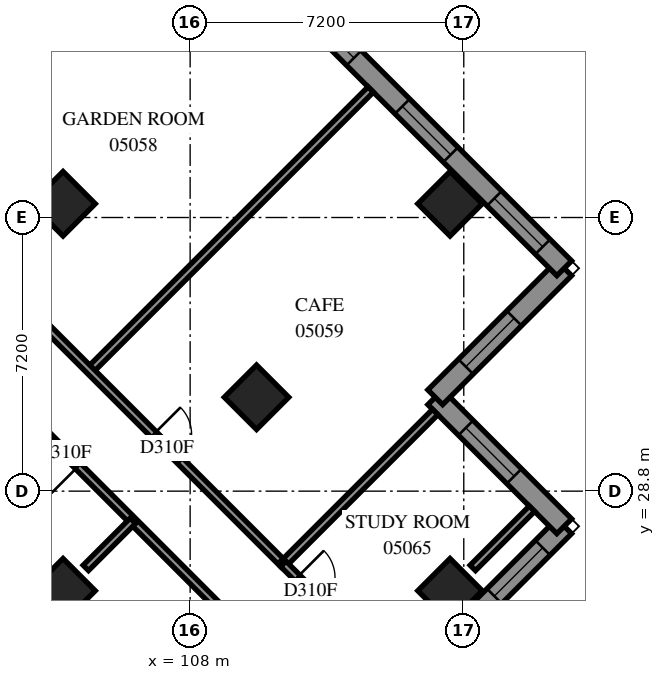
"""IFC4 building model, lengths in metres.
Left out: names, types, materials, properties, quantities, classifications, styles, units other than length and angle.
Written with IfcOpenShell. Run it as: python <this file> out.ifc"""

import sys

from ifc_helpers import new_model, si_unit, direction, frame, frame_2d, origin, origin_2d, place, context, subcontext, project, spatial, polyline, rectangle, outline, extrude, element, fill, save


model = new_model("IFC4")
c1 = context("Model", 3, precision=1e-05, world=origin(), true_north=direction((0.0, 1.0)))
c2 = subcontext(c1, "Body", "Model", "MODEL_VIEW")
j1 = project(units=[si_unit("LENGTHUNIT", "METRE"), si_unit("PLANEANGLEUNIT", "RADIAN")], contexts=[c1])
p1 = place(None, origin())
s1 = spatial("IfcSite", under=j1, at=p1, CompositionType="ELEMENT")
p2 = place(p1, origin())
s2 = spatial("IfcBuilding", under=s1, at=p2, CompositionType="ELEMENT")
p3 = place(p2, frame((0.0, 0.0, 22.8)))
s3 = spatial("IfcBuildingStorey", under=s2, at=p3, CompositionType="ELEMENT", Elevation=22.8)
for number, where, z_axis, x_axis in (
    (1, (104.656, 36.362, 0.0), (0.0, 0.0, 1.0), (0.707, -0.707, 0.0)),
    (2, (114.838, 36.362, 0.0), (0.0, 0.0, 1.0), (0.707, -0.707, 0.0)),
    (3, (109.747, 31.271, 0.0), (0.0, 0.0, 1.0), (0.707, -0.707, 0.0)),
    (4, (104.656, 26.18, 0.0), (0.0, 0.0, 1.0), (0.707, -0.707, 0.0)),
    (5, (114.838, 26.18, 0.0), (0.0, 0.0, 1.0), (0.707, -0.707, 0.0)),
):
    element("IfcColumn", number, at=place(p3, frame(where, z_axis=z_axis, x_axis=x_axis)), inside=s3, PredefinedType="COLUMN", context=c2, shape_type="SweptSolid", body=[
        extrude(rectangle(XDim=1.2, YDim=1.2, at=origin_2d()), origin(), (0.0, 0.0, 1.0), 3.9),
    ])
p4 = place(p3, frame((104.656, 14.689, 0.0), z_axis=(0.0, 0.0, 1.0), x_axis=(0.7071094621, 0.7071041002, 0.0)))
e6 = element("IfcWall", 6, at=p4, inside=s3, PredefinedType="SOLIDWALL", context=c2, shape_type="SweptSolid", body=[
    extrude(outline(polyline([(-0.275, -0.275), (18.925, -0.275), (18.375, 0.275), (0.275, 0.275), (-0.275, -0.275)])), origin(), (0.0, 0.0, 1.0), 3.9),
])
p5 = place(p4, frame((1.825, 0.0, 0.7)))
e7 = element("IfcOpeningElement", 7, at=p5, cuts=e6, PredefinedType="OPENING", context=c2, shape_type="SweptSolid", body=[
    extrude(rectangle(XDim=1.8, YDim=2.4, at=frame_2d((0.9, 1.2))), frame((0.0, 0.285, 0.0), z_axis=(0.0, -1.0, 0.0), x_axis=(1.0, 0.0, 0.0)), (0.0, 0.0, 1.0), 0.57),
])
p6 = place(p4, frame((5.425, 0.0, 0.7)))
e8 = element("IfcOpeningElement", 8, at=p6, cuts=e6, PredefinedType="OPENING", context=c2, shape_type="SweptSolid", body=[
    extrude(rectangle(XDim=1.8, YDim=2.4, at=frame_2d((0.9, 1.2))), frame((0.0, 0.285, 0.0), z_axis=(0.0, -1.0, 0.0), x_axis=(1.0, 0.0, 0.0)), (0.0, 0.0, 1.0), 0.57),
])
p7 = place(p4, frame((8.775, 0.0, 0.7)))
e9 = element("IfcOpeningElement", 9, at=p7, cuts=e6, PredefinedType="OPENING", context=c2, shape_type="SweptSolid", body=[
    extrude(rectangle(XDim=1.8, YDim=2.4, at=frame_2d((0.9, 1.2))), frame((0.0, 0.285, 0.0), z_axis=(0.0, -1.0, 0.0), x_axis=(1.0, 0.0, 0.0)), (0.0, 0.0, 1.0), 0.57),
])
p8 = place(p4, frame((12.875, 0.0, 0.7)))
e10 = element("IfcOpeningElement", 10, at=p8, cuts=e6, PredefinedType="OPENING", context=c2, shape_type="SweptSolid", body=[
    extrude(rectangle(XDim=1.8, YDim=2.4, at=frame_2d((0.9, 1.2))), frame((0.0, 0.285, 0.0), z_axis=(0.0, -1.0, 0.0), x_axis=(1.0, 0.0, 0.0)), (0.0, 0.0, 1.0), 0.57),
])
p9 = place(p4, frame((16.05, 0.0, 0.7)))
e11 = element("IfcOpeningElement", 11, at=p9, cuts=e6, PredefinedType="OPENING", context=c2, shape_type="SweptSolid", body=[
    extrude(rectangle(XDim=1.8, YDim=2.4, at=frame_2d((0.9, 1.2))), frame((0.0, 0.285, 0.0), z_axis=(0.0, -1.0, 0.0), x_axis=(1.0, 0.0, 0.0)), (0.0, 0.0, 1.0), 0.57),
])
p10 = place(p3, frame((117.843, 27.877, 0.0), z_axis=(0.0, 0.0, 1.0), x_axis=(-0.7071067812, 0.7071067812, 0.0)))
e12 = element("IfcWall", 12, at=p10, inside=s3, PredefinedType="SOLIDWALL", context=c2, shape_type="SweptSolid", body=[
    extrude(outline(polyline([(-0.275, -0.275), (4.525, -0.275), (5.075, 0.275), (0.275, 0.275), (-0.275, -0.275)])), origin(), (0.0, 0.0, 1.0), 3.9),
])
p11 = place(p10, frame((1.863, 0.0, 0.7)))
e13 = element("IfcOpeningElement", 13, at=p11, cuts=e12, PredefinedType="OPENING", context=c2, shape_type="SweptSolid", body=[
    extrude(rectangle(XDim=1.8, YDim=2.4, at=frame_2d((0.9, 1.2))), frame((0.0, 0.285, 0.0), z_axis=(0.0, -1.0, 0.0), x_axis=(1.0, 0.0, 0.0)), (0.0, 0.0, 1.0), 0.57),
])
p12 = place(p3, frame((114.449, 31.271, 0.0), z_axis=(0.0, 0.0, 1.0), x_axis=(0.7070963646, 0.7071171977, 0.0)))
e14 = element("IfcWall", 14, at=p12, inside=s3, PredefinedType="SOLIDWALL", context=c2, shape_type="SweptSolid", body=[
    extrude(outline(polyline([(0.275, -0.275), (5.075, -0.275), (4.525, 0.275), (-0.275, 0.275), (0.275, -0.275)])), origin(), (0.0, 0.0, 1.0), 3.9),
])
p13 = place(p12, frame((1.137, 0.0, 0.7)))
e15 = element("IfcOpeningElement", 15, at=p13, cuts=e14, PredefinedType="OPENING", context=c2, shape_type="SweptSolid", body=[
    extrude(rectangle(XDim=1.8, YDim=2.4, at=frame_2d((0.9, 1.2))), frame((0.0, 0.285, 0.0), z_axis=(0.0, -1.0, 0.0), x_axis=(1.0, 0.0, 0.0)), (0.0, 0.0, 1.0), 0.57),
])
p14 = place(p3, frame((117.843, 34.665, 0.0), z_axis=(0.0, 0.0, 1.0), x_axis=(-0.7071067812, 0.7071067812, 0.0)))
e16 = element("IfcWall", 16, at=p14, inside=s3, PredefinedType="SOLIDWALL", context=c2, shape_type="SweptSolid", body=[
    extrude(outline(polyline([(-0.275, -0.275), (54.222, -0.275), (53.994, 0.275), (0.275, 0.275), (-0.275, -0.275)])), origin(), (0.0, 0.0, 1.0), 3.9),
])
p15 = place(p14, frame((0.8, 0.0, 0.7)))
e17 = element("IfcOpeningElement", 17, at=p15, cuts=e16, PredefinedType="OPENING", context=c2, shape_type="SweptSolid", body=[
    extrude(rectangle(XDim=1.8, YDim=2.4, at=frame_2d((0.9, 1.2))), frame((0.0, 0.285, 0.0), z_axis=(0.0, -1.0, 0.0), x_axis=(1.0, 0.0, 0.0)), (0.0, 0.0, 1.0), 0.57),
])
p16 = place(p14, frame((4.225, 0.0, 0.7)))
e18 = element("IfcOpeningElement", 18, at=p16, cuts=e16, PredefinedType="OPENING", context=c2, shape_type="SweptSolid", body=[
    extrude(rectangle(XDim=1.8, YDim=2.4, at=frame_2d((0.9, 1.2))), frame((0.0, 0.285, 0.0), z_axis=(0.0, -1.0, 0.0), x_axis=(1.0, 0.0, 0.0)), (0.0, 0.0, 1.0), 0.57),
])
p17 = place(p14, frame((7.825, 0.0, 0.7)))
e19 = element("IfcOpeningElement", 19, at=p17, cuts=e16, PredefinedType="OPENING", context=c2, shape_type="SweptSolid", body=[
    extrude(rectangle(XDim=1.8, YDim=2.4, at=frame_2d((0.9, 1.2))), frame((0.0, 0.285, 0.0), z_axis=(0.0, -1.0, 0.0), x_axis=(1.0, 0.0, 0.0)), (0.0, 0.0, 1.0), 0.57),
])
p18 = place(p14, frame((11.425, 0.0, 0.7)))
e20 = element("IfcOpeningElement", 20, at=p18, cuts=e16, PredefinedType="OPENING", context=c2, shape_type="SweptSolid", body=[
    extrude(rectangle(XDim=1.8, YDim=2.4, at=frame_2d((0.9, 1.2))), frame((0.0, 0.285, 0.0), z_axis=(0.0, -1.0, 0.0), x_axis=(1.0, 0.0, 0.0)), (0.0, 0.0, 1.0), 0.57),
])
p19 = place(p14, frame((15.025, 0.0, 0.7)))
e21 = element("IfcOpeningElement", 21, at=p19, cuts=e16, PredefinedType="OPENING", context=c2, shape_type="SweptSolid", body=[
    extrude(rectangle(XDim=1.8, YDim=2.4, at=frame_2d((0.9, 1.2))), frame((0.0, 0.285, 0.0), z_axis=(0.0, -1.0, 0.0), x_axis=(1.0, 0.0, 0.0)), (0.0, 0.0, 1.0), 0.57),
])
p20 = place(p14, frame((18.625, 0.0, 0.7)))
e22 = element("IfcOpeningElement", 22, at=p20, cuts=e16, PredefinedType="OPENING", context=c2, shape_type="SweptSolid", body=[
    extrude(rectangle(XDim=1.8, YDim=2.4, at=frame_2d((0.9, 1.2))), frame((0.0, 0.285, 0.0), z_axis=(0.0, -1.0, 0.0), x_axis=(1.0, 0.0, 0.0)), (0.0, 0.0, 1.0), 0.57),
])
p21 = place(p14, frame((22.225, 0.0, 0.7)))
e23 = element("IfcOpeningElement", 23, at=p21, cuts=e16, PredefinedType="OPENING", context=c2, shape_type="SweptSolid", body=[
    extrude(rectangle(XDim=1.8, YDim=2.4, at=frame_2d((0.9, 1.2))), frame((0.0, 0.285, 0.0), z_axis=(0.0, -1.0, 0.0), x_axis=(1.0, 0.0, 0.0)), (0.0, 0.0, 1.0), 0.57),
])
p22 = place(p14, frame((25.825, 0.0, 0.7)))
e24 = element("IfcOpeningElement", 24, at=p22, cuts=e16, PredefinedType="OPENING", context=c2, shape_type="SweptSolid", body=[
    extrude(rectangle(XDim=1.8, YDim=2.4, at=frame_2d((0.9, 1.2))), frame((0.0, 0.285, 0.0), z_axis=(0.0, -1.0, 0.0), x_axis=(1.0, 0.0, 0.0)), (0.0, 0.0, 1.0), 0.57),
])
p23 = place(p14, frame((29.425, 0.0, 0.7)))
e25 = element("IfcOpeningElement", 25, at=p23, cuts=e16, PredefinedType="OPENING", context=c2, shape_type="SweptSolid", body=[
    extrude(rectangle(XDim=1.8, YDim=2.4, at=frame_2d((0.9, 1.2))), frame((0.0, 0.285, 0.0), z_axis=(0.0, -1.0, 0.0), x_axis=(1.0, 0.0, 0.0)), (0.0, 0.0, 1.0), 0.57),
])
p24 = place(p14, frame((33.025, 0.0, 0.7)))
e26 = element("IfcOpeningElement", 26, at=p24, cuts=e16, PredefinedType="OPENING", context=c2, shape_type="SweptSolid", body=[
    extrude(rectangle(XDim=1.8, YDim=2.4, at=frame_2d((0.9, 1.2))), frame((0.0, 0.285, 0.0), z_axis=(0.0, -1.0, 0.0), x_axis=(1.0, 0.0, 0.0)), (0.0, 0.0, 1.0), 0.57),
])
p25 = place(p14, frame((36.625, 0.0, 0.7)))
e27 = element("IfcOpeningElement", 27, at=p25, cuts=e16, PredefinedType="OPENING", context=c2, shape_type="SweptSolid", body=[
    extrude(rectangle(XDim=1.8, YDim=2.4, at=frame_2d((0.9, 1.2))), frame((0.0, 0.285, 0.0), z_axis=(0.0, -1.0, 0.0), x_axis=(1.0, 0.0, 0.0)), (0.0, 0.0, 1.0), 0.57),
])
p26 = place(p14, frame((40.225, 0.0, 0.7)))
e28 = element("IfcOpeningElement", 28, at=p26, cuts=e16, PredefinedType="OPENING", context=c2, shape_type="SweptSolid", body=[
    extrude(rectangle(XDim=1.8, YDim=2.4, at=frame_2d((0.9, 1.2))), frame((0.0, 0.285, 0.0), z_axis=(0.0, -1.0, 0.0), x_axis=(1.0, 0.0, 0.0)), (0.0, 0.0, 1.0), 0.57),
])
p27 = place(p14, frame((43.825, 0.0, 0.7)))
e29 = element("IfcOpeningElement", 29, at=p27, cuts=e16, PredefinedType="OPENING", context=c2, shape_type="SweptSolid", body=[
    extrude(rectangle(XDim=1.8, YDim=2.4, at=frame_2d((0.9, 1.2))), frame((0.0, 0.285, 0.0), z_axis=(0.0, -1.0, 0.0), x_axis=(1.0, 0.0, 0.0)), (0.0, 0.0, 1.0), 0.57),
])
p28 = place(p14, frame((47.425, 0.0, 0.7)))
e30 = element("IfcOpeningElement", 30, at=p28, cuts=e16, PredefinedType="OPENING", context=c2, shape_type="SweptSolid", body=[
    extrude(rectangle(XDim=1.8, YDim=2.4, at=frame_2d((0.9, 1.2))), frame((0.0, 0.285, 0.0), z_axis=(0.0, -1.0, 0.0), x_axis=(1.0, 0.0, 0.0)), (0.0, 0.0, 1.0), 0.57),
])
p29 = place(p14, frame((51.06, 0.0, 0.7)))
e31 = element("IfcOpeningElement", 31, at=p29, cuts=e16, PredefinedType="OPENING", context=c2, shape_type="SweptSolid", body=[
    extrude(rectangle(XDim=1.8, YDim=2.4, at=frame_2d((0.9, 1.2))), frame((0.0, 0.285, 0.0), z_axis=(0.0, -1.0, 0.0), x_axis=(1.0, 0.0, 0.0)), (0.0, 0.0, 1.0), 0.57),
])
p30 = place(p3, frame((77.07, 42.275, 0.0), z_axis=(0.0, 0.0, 1.0), x_axis=(0.7071067812, -0.7071067812, 0.0)))
e32 = element("IfcWall", 32, at=p30, inside=s3, PredefinedType="SOLIDWALL", context=c2, shape_type="SweptSolid", body=[
    extrude(outline(polyline([(0.114, -0.275), (39.288, -0.275), (38.737, 0.275), (-0.114, 0.275), (0.114, -0.275)])), origin(), (0.0, 0.0, 1.0), 3.9),
])
p31 = place(p30, frame((2.837, 0.0, 0.7)))
e33 = element("IfcOpeningElement", 33, at=p31, cuts=e32, PredefinedType="OPENING", context=c2, shape_type="SweptSolid", body=[
    extrude(rectangle(XDim=1.8, YDim=2.4, at=frame_2d((0.9, 1.2))), frame((0.0, 0.285, 0.0), z_axis=(0.0, -1.0, 0.0), x_axis=(1.0, 0.0, 0.0)), (0.0, 0.0, 1.0), 0.57),
])
p32 = place(p30, frame((6.588, 0.0, 0.7)))
e34 = element("IfcOpeningElement", 34, at=p32, cuts=e32, PredefinedType="OPENING", context=c2, shape_type="SweptSolid", body=[
    extrude(rectangle(XDim=1.8, YDim=2.4, at=frame_2d((0.9, 1.2))), frame((0.0, 0.285, 0.0), z_axis=(0.0, -1.0, 0.0), x_axis=(1.0, 0.0, 0.0)), (0.0, 0.0, 1.0), 0.57),
])
p33 = place(p30, frame((10.188, 0.0, 0.7)))
e35 = element("IfcOpeningElement", 35, at=p33, cuts=e32, PredefinedType="OPENING", context=c2, shape_type="SweptSolid", body=[
    extrude(rectangle(XDim=1.8, YDim=2.4, at=frame_2d((0.9, 1.2))), frame((0.0, 0.285, 0.0), z_axis=(0.0, -1.0, 0.0), x_axis=(1.0, 0.0, 0.0)), (0.0, 0.0, 1.0), 0.57),
])
p34 = place(p30, frame((13.787, 0.0, 0.7)))
e36 = element("IfcOpeningElement", 36, at=p34, cuts=e32, PredefinedType="OPENING", context=c2, shape_type="SweptSolid", body=[
    extrude(rectangle(XDim=1.8, YDim=2.4, at=frame_2d((0.9, 1.2))), frame((0.0, 0.285, 0.0), z_axis=(0.0, -1.0, 0.0), x_axis=(1.0, 0.0, 0.0)), (0.0, 0.0, 1.0), 0.57),
])
p35 = place(p30, frame((17.387, 0.0, 0.7)))
e37 = element("IfcOpeningElement", 37, at=p35, cuts=e32, PredefinedType="OPENING", context=c2, shape_type="SweptSolid", body=[
    extrude(rectangle(XDim=1.8, YDim=2.4, at=frame_2d((0.9, 1.2))), frame((0.0, 0.285, 0.0), z_axis=(0.0, -1.0, 0.0), x_axis=(1.0, 0.0, 0.0)), (0.0, 0.0, 1.0), 0.57),
])
p36 = place(p30, frame((20.988, 0.0, 0.7)))
e38 = element("IfcOpeningElement", 38, at=p36, cuts=e32, PredefinedType="OPENING", context=c2, shape_type="SweptSolid", body=[
    extrude(rectangle(XDim=1.8, YDim=2.4, at=frame_2d((0.9, 1.2))), frame((0.0, 0.285, 0.0), z_axis=(0.0, -1.0, 0.0), x_axis=(1.0, 0.0, 0.0)), (0.0, 0.0, 1.0), 0.57),
])
p37 = place(p30, frame((24.587, 0.0, 0.7)))
e39 = element("IfcOpeningElement", 39, at=p37, cuts=e32, PredefinedType="OPENING", context=c2, shape_type="SweptSolid", body=[
    extrude(rectangle(XDim=1.8, YDim=2.4, at=frame_2d((0.9, 1.2))), frame((0.0, 0.285, 0.0), z_axis=(0.0, -1.0, 0.0), x_axis=(1.0, 0.0, 0.0)), (0.0, 0.0, 1.0), 0.57),
])
p38 = place(p30, frame((28.188, 0.0, 0.7)))
e40 = element("IfcOpeningElement", 40, at=p38, cuts=e32, PredefinedType="OPENING", context=c2, shape_type="SweptSolid", body=[
    extrude(rectangle(XDim=1.8, YDim=2.4, at=frame_2d((0.9, 1.2))), frame((0.0, 0.285, 0.0), z_axis=(0.0, -1.0, 0.0), x_axis=(1.0, 0.0, 0.0)), (0.0, 0.0, 1.0), 0.57),
])
p39 = place(p30, frame((31.788, 0.0, 0.7)))
e41 = element("IfcOpeningElement", 41, at=p39, cuts=e32, PredefinedType="OPENING", context=c2, shape_type="SweptSolid", body=[
    extrude(rectangle(XDim=1.8, YDim=2.4, at=frame_2d((0.9, 1.2))), frame((0.0, 0.285, 0.0), z_axis=(0.0, -1.0, 0.0), x_axis=(1.0, 0.0, 0.0)), (0.0, 0.0, 1.0), 0.57),
])
p40 = place(p30, frame((35.388, 0.0, 0.7)))
e42 = element("IfcOpeningElement", 42, at=p40, cuts=e32, PredefinedType="OPENING", context=c2, shape_type="SweptSolid", body=[
    extrude(rectangle(XDim=1.8, YDim=2.4, at=frame_2d((0.9, 1.2))), frame((0.0, 0.285, 0.0), z_axis=(0.0, -1.0, 0.0), x_axis=(1.0, 0.0, 0.0)), (0.0, 0.0, 1.0), 0.57),
])
p41 = place(p3, frame((111.583, 22.923, 0.0), z_axis=(0.0, 0.0, 1.0), x_axis=(-0.7070026136, 0.7072109334, 0.0)))
e43 = element("IfcWall", 43, at=p41, inside=s3, PredefinedType="PARTITIONING", context=c2, shape_type="SweptSolid", body=[
    extrude(rectangle(XDim=14.401, YDim=0.2, at=frame_2d((7.2, 0.0))), origin(), (0.0, 0.0, 1.0), 3.9),
])
p42 = place(p41, frame((9.233, 0.0, 0.0)))
e44 = element("IfcOpeningElement", 44, at=p42, cuts=e43, PredefinedType="OPENING", context=c2, shape_type="SweptSolid", body=[
    extrude(rectangle(XDim=1.0, YDim=2.1, at=frame_2d((0.5, 1.05))), frame((0.0, 0.11, 0.0), z_axis=(0.0, -1.0, 0.0), x_axis=(1.0, 0.0, 0.0)), (0.0, 0.0, 1.0), 0.22),
])
p43 = place(p41, frame((2.338, 0.0, 0.0)))
e45 = element("IfcOpeningElement", 45, at=p43, cuts=e43, PredefinedType="OPENING", context=c2, shape_type="SweptSolid", body=[
    extrude(rectangle(XDim=1.0, YDim=2.1, at=frame_2d((0.5, 1.05))), frame((0.0, 0.11, 0.0), z_axis=(0.0, -1.0, 0.0), x_axis=(1.0, 0.0, 0.0)), (0.0, 0.0, 1.0), 0.22),
])
for number, where, z_axis, x_axis in (
    (46, (105.362, 31.978, 0.0), (0.0, 0.0, 1.0), (0.707, 0.707, 0.0)),
    (47, (100.271, 37.069, 0.0), (0.0, 0.0, 1.0), (0.707, 0.707, 0.0)),
):
    element("IfcWall", number, at=place(p3, frame(where, z_axis=z_axis, x_axis=x_axis)), inside=s3, PredefinedType="PARTITIONING", context=c2, shape_type="SweptSolid", body=[
        extrude(rectangle(XDim=10.45, YDim=0.2, at=frame_2d((5.225, 0.0))), origin(), (0.0, 0.0, 1.0), 3.9),
    ])
p44 = place(p3, frame((104.087, 33.247, 0.0), z_axis=(0.0, 0.0, 1.0), x_axis=(0.7071067812, -0.7071067812, 0.0)))
e48 = element("IfcWall", 48, at=p44, inside=s3, PredefinedType="PARTITIONING", context=c2, shape_type="SweptSolid", body=[
    extrude(rectangle(XDim=9.0, YDim=0.2, at=frame_2d((4.5, 0.0))), origin(), (0.0, 0.0, 1.0), 3.9),
])
p45 = place(p44, frame((4.173, 0.0, 0.0)))
e49 = element("IfcOpeningElement", 49, at=p45, cuts=e48, PredefinedType="OPENING", context=c2, shape_type="SweptSolid", body=[
    extrude(rectangle(XDim=1.0, YDim=2.1, at=frame_2d((0.5, 1.05))), frame((0.0, 0.11, 0.0), z_axis=(0.0, -1.0, 0.0), x_axis=(1.0, 0.0, 0.0)), (0.0, 0.0, 1.0), 0.22),
])
p46 = place(p3, frame((110.453, 26.887, 0.0), z_axis=(0.0, 0.0, 1.0), x_axis=(0.7071067812, 0.7071067812, 0.0)))
e50 = element("IfcWall", 50, at=p46, inside=s3, PredefinedType="PARTITIONING", context=c2, shape_type="SweptSolid", body=[
    extrude(rectangle(XDim=5.651, YDim=0.2, at=frame_2d((2.825, 0.0))), origin(), (0.0, 0.0, 1.0), 3.9),
])
p47 = place(p3, frame((110.453, 26.885, 0.0), z_axis=(0.0, 0.0, 1.0), x_axis=(0.7073845681, -0.7068288851, 0.0)))
e51 = element("IfcWall", 51, at=p47, inside=s3, PredefinedType="PARTITIONING", context=c2, shape_type="SweptSolid", body=[
    extrude(rectangle(XDim=3.599, YDim=0.2, at=frame_2d((1.8, 0.0))), origin(), (0.0, 0.0, 1.0), 3.9),
])
p48 = place(p47, frame((0.507, 0.0, 0.0)))
e52 = element("IfcOpeningElement", 52, at=p48, cuts=e51, PredefinedType="OPENING", context=c2, shape_type="SweptSolid", body=[
    extrude(rectangle(XDim=1.0, YDim=2.1, at=frame_2d((0.5, 1.05))), frame((0.0, 0.11, 0.0), z_axis=(0.0, -1.0, 0.0), x_axis=(1.0, 0.0, 0.0)), (0.0, 0.0, 1.0), 0.22),
])
p49 = place(p3, frame((115.438, 26.78, 0.0), z_axis=(0.0, 0.0, 1.0), x_axis=(0.7071067812, 0.7071067812, 0.0)))
e53 = element("IfcWall", 53, at=p49, inside=s3, PredefinedType="PARTITIONING", context=c2, shape_type="SweptSolid", body=[
    extrude(rectangle(XDim=2.201, YDim=0.2, at=frame_2d((1.101, 0.0))), origin(), (0.0, 0.0, 1.0), 3.9),
])
p50 = place(p3, frame((105.255, 26.781, 0.0), z_axis=(0.0, 0.0, 1.0), x_axis=(0.7071067812, 0.7071067812, 0.0)))
e54 = element("IfcWall", 54, at=p50, inside=s3, PredefinedType="PARTITIONING", context=c2, shape_type="SweptSolid", body=[
    extrude(rectangle(XDim=1.751, YDim=0.2, at=frame_2d((0.875, 0.0))), origin(), (0.0, 0.0, 1.0), 3.9),
])
p51 = place(p9, origin())
e55 = element("IfcWindow", 55, at=p51, inside=s3, PartitioningType="SINGLE_PANEL", PredefinedType="WINDOW", context=c2, shape_type="SweptSolid", body=[
    extrude(rectangle(XDim=1.8, YDim=2.4, at=frame_2d((0.9, 1.2))), frame((0.0, 0.155, 0.0), z_axis=(0.0, -1.0, 0.0), x_axis=(1.0, 0.0, 0.0)), (0.0, 0.0, 1.0), 0.06),
])
fill(e11, e55)
p52 = place(p11, origin())
e56 = element("IfcWindow", 56, at=p52, inside=s3, PartitioningType="SINGLE_PANEL", PredefinedType="WINDOW", context=c2, shape_type="SweptSolid", body=[
    extrude(rectangle(XDim=1.8, YDim=2.4, at=frame_2d((0.9, 1.2))), frame((0.0, 0.155, 0.0), z_axis=(0.0, -1.0, 0.0), x_axis=(1.0, 0.0, 0.0)), (0.0, 0.0, 1.0), 0.06),
])
fill(e13, e56)
p53 = place(p13, origin())
e57 = element("IfcWindow", 57, at=p53, inside=s3, PartitioningType="SINGLE_PANEL", PredefinedType="WINDOW", context=c2, shape_type="SweptSolid", body=[
    extrude(rectangle(XDim=1.8, YDim=2.4, at=frame_2d((0.9, 1.2))), frame((0.0, 0.155, 0.0), z_axis=(0.0, -1.0, 0.0), x_axis=(1.0, 0.0, 0.0)), (0.0, 0.0, 1.0), 0.06),
])
fill(e15, e57)
p54 = place(p15, origin())
e58 = element("IfcWindow", 58, at=p54, inside=s3, PartitioningType="SINGLE_PANEL", PredefinedType="WINDOW", context=c2, shape_type="SweptSolid", body=[
    extrude(rectangle(XDim=1.8, YDim=2.4, at=frame_2d((0.9, 1.2))), frame((0.0, 0.155, 0.0), z_axis=(0.0, -1.0, 0.0), x_axis=(1.0, 0.0, 0.0)), (0.0, 0.0, 1.0), 0.06),
])
fill(e17, e58)
p55 = place(p16, origin())
e59 = element("IfcWindow", 59, at=p55, inside=s3, PartitioningType="SINGLE_PANEL", PredefinedType="WINDOW", context=c2, shape_type="SweptSolid", body=[
    extrude(rectangle(XDim=1.8, YDim=2.4, at=frame_2d((0.9, 1.2))), frame((0.0, 0.155, 0.0), z_axis=(0.0, -1.0, 0.0), x_axis=(1.0, 0.0, 0.0)), (0.0, 0.0, 1.0), 0.06),
])
fill(e18, e59)
p56 = place(p17, origin())
e60 = element("IfcWindow", 60, at=p56, inside=s3, PartitioningType="SINGLE_PANEL", PredefinedType="WINDOW", context=c2, shape_type="SweptSolid", body=[
    extrude(rectangle(XDim=1.8, YDim=2.4, at=frame_2d((0.9, 1.2))), frame((0.0, 0.155, 0.0), z_axis=(0.0, -1.0, 0.0), x_axis=(1.0, 0.0, 0.0)), (0.0, 0.0, 1.0), 0.06),
])
fill(e19, e60)
p57 = place(p45, origin())
e61 = element("IfcDoor", 61, at=p57, inside=s3, OperationType="SINGLE_SWING_RIGHT", PredefinedType="DOOR", context=c2, shape_type="SweptSolid", body=[
    extrude(rectangle(XDim=1.0, YDim=2.1, at=frame_2d((0.5, 1.05))), frame((0.0, 0.025, 0.0), z_axis=(0.0, -1.0, 0.0), x_axis=(1.0, 0.0, 0.0)), (0.0, 0.0, 1.0), 0.05),
])
fill(e49, e61)
p58 = place(p42, origin())
e62 = element("IfcDoor", 62, at=p58, inside=s3, OperationType="SINGLE_SWING_LEFT", PredefinedType="DOOR", context=c2, shape_type="SweptSolid", body=[
    extrude(rectangle(XDim=1.0, YDim=2.1, at=frame_2d((0.5, 1.05))), frame((0.0, 0.025, 0.0), z_axis=(0.0, -1.0, 0.0), x_axis=(1.0, 0.0, 0.0)), (0.0, 0.0, 1.0), 0.05),
])
fill(e44, e62)
p59 = place(p48, origin())
e63 = element("IfcDoor", 63, at=p59, inside=s3, OperationType="SINGLE_SWING_RIGHT", PredefinedType="DOOR", context=c2, shape_type="SweptSolid", body=[
    extrude(rectangle(XDim=1.0, YDim=2.1, at=frame_2d((0.5, 1.05))), frame((0.0, 0.025, 0.0), z_axis=(0.0, -1.0, 0.0), x_axis=(1.0, 0.0, 0.0)), (0.0, 0.0, 1.0), 0.05),
])
fill(e52, e63)
save(model, sys.argv[1])
